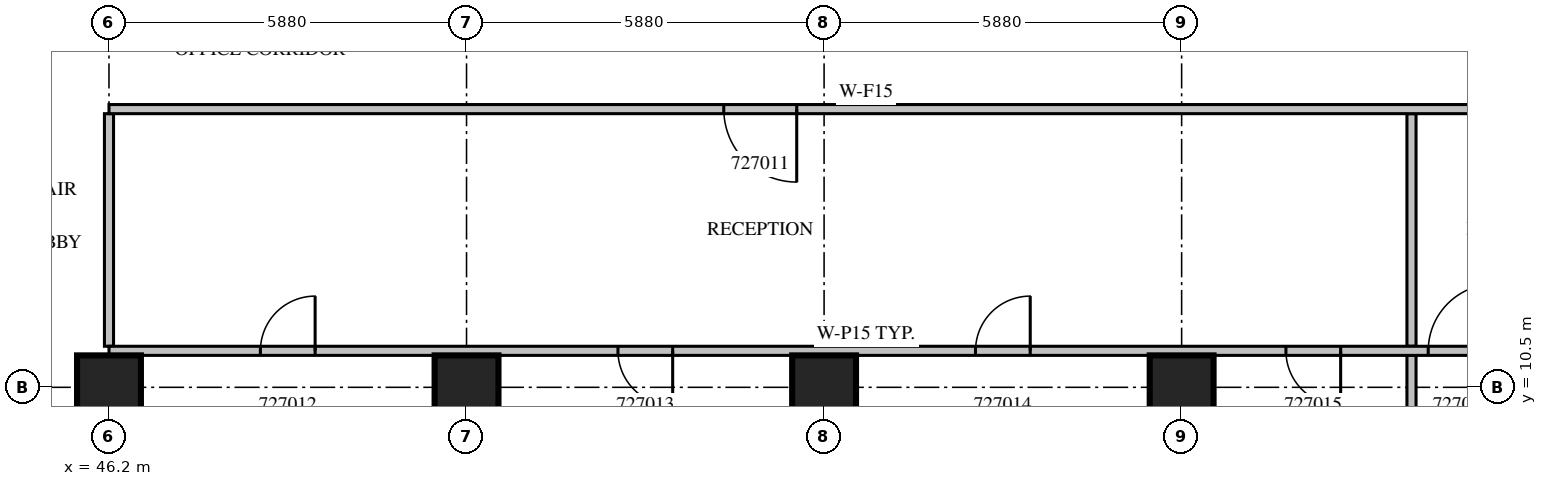
"""IFC4 building model, lengths in metres.
Left out: names, types, materials, properties, quantities, classifications, styles, units other than length and angle.
Written with IfcOpenShell. Run it as: python <this file> out.ifc"""

import sys

from ifc_helpers import new_model, si_unit, direction, frame, frame_2d, origin, origin_2d, place, context, subcontext, project, spatial, rectangle, extrude, source, transform, mapped, element, fill, save


model = new_model("IFC4")
c1 = context("Model", 3, precision=1e-05, world=origin(), true_north=direction((0.0, 1.0)))
c2 = subcontext(c1, "Body", "Model", "MODEL_VIEW")
j1 = project(units=[si_unit("LENGTHUNIT", "METRE"), si_unit("PLANEANGLEUNIT", "RADIAN")], contexts=[c1])
p1 = place(None, origin())
s1 = spatial("IfcSite", under=j1, at=p1, CompositionType="ELEMENT")
p2 = place(p1, origin())
s2 = spatial("IfcBuilding", under=s1, at=p2, CompositionType="ELEMENT")
p3 = place(p2, frame((0.0, 0.0, 124.5)))
s3 = spatial("IfcBuildingStorey", under=s2, at=p3, CompositionType="ELEMENT", Elevation=124.5)
m1 = source(origin(), c2, "Body", "SweptSolid", [
    extrude(rectangle(XDim=1.05, YDim=1.05, at=origin_2d()), origin(), (0.0, 0.0, 1.0), 4.2),
])
for number, where, z_axis, x_axis in (
    (1, (46.2, 10.5, 0.0), (0.0, 0.0, 1.0), (1.0, 0.0, 0.0)),
    (2, (52.08, 10.5, 0.0), (0.0, 0.0, 1.0), (1.0, 0.0, 0.0)),
    (3, (57.96, 10.5, 0.0), (0.0, 0.0, 1.0), (1.0, 0.0, 0.0)),
    (4, (63.84, 10.5, 0.0), (0.0, 0.0, 1.0), (1.0, 0.0, 0.0)),
):
    element("IfcColumn", number, at=place(p3, frame(where, z_axis=z_axis, x_axis=x_axis)), inside=s3, PredefinedType="COLUMN", context=c2, shape_type="MappedRepresentation", body=[
        mapped(m1, transform((0.0, 0.0, 0.0), scale=1.0)),
    ])
m2 = source(origin(), c2, "Body", "SweptSolid", [
    extrude(rectangle(XDim=3.825, YDim=0.15, at=frame_2d((1.913, 0.0))), origin(), (0.0, 0.0, 1.0), 3.8),
])
p4 = place(p3, frame((46.2, 11.175, 0.0), z_axis=(0.0, 0.0, 1.0), x_axis=(0.0, 1.0, 0.0)))
e5 = element("IfcWall", 5, at=p4, inside=s3, PredefinedType="PARTITIONING", context=c2, shape_type="MappedRepresentation", body=[
    mapped(m2, transform((0.0, 0.0, 0.0), scale=1.0)),
])
m3 = source(origin(), c2, "Body", "SweptSolid", [
    extrude(rectangle(XDim=6.62, YDim=0.15, at=frame_2d((3.31, 0.0))), origin(), (0.0, 0.0, 1.0), 3.8),
])
p5 = place(p3, frame((67.62, 4.405, 0.0), z_axis=(0.0, 0.0, 1.0), x_axis=(0.0, 1.0, 0.0)))
e6 = element("IfcWall", 6, at=p5, inside=s3, PredefinedType="PARTITIONING", context=c2, shape_type="MappedRepresentation", body=[
    mapped(m3, transform((0.0, 0.0, 0.0), scale=1.0)),
])
p6 = place(p3, frame((67.62, 11.175, 0.0), z_axis=(0.0, 0.0, 1.0), x_axis=(0.0, 1.0, 0.0)))
e7 = element("IfcWall", 7, at=p6, inside=s3, PredefinedType="PARTITIONING", context=c2, shape_type="MappedRepresentation", body=[
    mapped(m2, transform((0.0, 0.0, 0.0), scale=1.0)),
])
m4 = source(origin(), c2, "Body", "SweptSolid", [
    extrude(rectangle(XDim=24.9, YDim=0.15, at=frame_2d((12.45, 0.0))), origin(), (0.0, 0.0, 1.0), 3.8),
])
p7 = place(p3, frame((71.1, 11.1, 0.0), z_axis=(0.0, 0.0, 1.0), x_axis=(-1.0, 0.0, 0.0)))
e8 = element("IfcWall", 8, at=p7, inside=s3, PredefinedType="PARTITIONING", context=c2, shape_type="MappedRepresentation", body=[
    mapped(m4, transform((0.0, 0.0, 0.0), scale=1.0)),
])
m5 = source(origin(), c2, "Body", "SweptSolid", [
    extrude(rectangle(XDim=0.9, YDim=2.1, at=frame_2d((0.45, 1.05))), frame((0.0, 0.085, 0.0), z_axis=(0.0, -1.0, 0.0), x_axis=(1.0, 0.0, 0.0)), (0.0, 0.0, 1.0), 0.17),
])
p8 = place(p7, frame((21.51, 0.0, 0.0)))
e9 = element("IfcOpeningElement", 9, at=p8, cuts=e8, PredefinedType="OPENING", context=c2, shape_type="MappedRepresentation", body=[
    mapped(m5, transform((0.0, 0.0, 0.0), scale=1.0)),
])
p9 = place(p7, frame((15.63, 0.0, 0.0)))
e10 = element("IfcOpeningElement", 10, at=p9, cuts=e8, PredefinedType="OPENING", context=c2, shape_type="MappedRepresentation", body=[
    mapped(m5, transform((0.0, 0.0, 0.0), scale=1.0)),
])
p10 = place(p7, frame((9.75, 0.0, 0.0)))
e11 = element("IfcOpeningElement", 11, at=p10, cuts=e8, PredefinedType="OPENING", context=c2, shape_type="MappedRepresentation", body=[
    mapped(m5, transform((0.0, 0.0, 0.0), scale=1.0)),
])
p11 = place(p7, frame((4.645, 0.0, 0.0)))
e12 = element("IfcOpeningElement", 12, at=p11, cuts=e8, PredefinedType="OPENING", context=c2, shape_type="MappedRepresentation", body=[
    mapped(m5, transform((0.0, 0.0, 0.0), scale=1.0)),
])
m6 = source(origin(), c2, "Body", "SweptSolid", [
    extrude(rectangle(XDim=1.1, YDim=2.1, at=frame_2d((0.55, 1.05))), frame((0.0, 0.085, 0.0), z_axis=(0.0, -1.0, 0.0), x_axis=(1.0, 0.0, 0.0)), (0.0, 0.0, 1.0), 0.17),
])
p12 = place(p7, frame((2.105, 0.0, 0.0)))
e13 = element("IfcOpeningElement", 13, at=p12, cuts=e8, PredefinedType="OPENING", context=c2, shape_type="MappedRepresentation", body=[
    mapped(m6, transform((0.0, 0.0, 0.0), scale=1.0)),
])
p13 = place(p3, frame((71.1, 15.075, 0.0), z_axis=(0.0, 0.0, 1.0), x_axis=(-1.0, 0.0, 0.0)))
e14 = element("IfcWall", 14, at=p13, inside=s3, PredefinedType="PARTITIONING", context=c2, shape_type="MappedRepresentation", body=[
    mapped(m4, transform((0.0, 0.0, 0.0), scale=1.0)),
])
m7 = source(origin(), c2, "Body", "SweptSolid", [
    extrude(rectangle(XDim=1.2, YDim=2.1, at=frame_2d((0.6, 1.05))), frame((0.0, 0.085, 0.0), z_axis=(0.0, -1.0, 0.0), x_axis=(1.0, 0.0, 0.0)), (0.0, 0.0, 1.0), 0.17),
])
p14 = place(p13, frame((13.59, 0.0, 0.0)))
e15 = element("IfcOpeningElement", 15, at=p14, cuts=e14, PredefinedType="OPENING", context=c2, shape_type="MappedRepresentation", body=[
    mapped(m7, transform((0.0, 0.0, 0.0), scale=1.0)),
])
p15 = place(p13, frame((1.153, 0.0, 0.0)))
e16 = element("IfcOpeningElement", 16, at=p15, cuts=e14, PredefinedType="OPENING", context=c2, shape_type="MappedRepresentation", body=[
    mapped(m6, transform((0.0, 0.0, 0.0), scale=1.0)),
])
m8 = source(origin(), c2, "Body", "SweptSolid", [
    extrude(rectangle(XDim=1.2, YDim=2.1, at=frame_2d((0.6, 1.05))), frame((0.0, 0.025, 0.0), z_axis=(0.0, -1.0, 0.0), x_axis=(1.0, 0.0, 0.0)), (0.0, 0.0, 1.0), 0.05),
])
p16 = place(p14, origin())
e17 = element("IfcDoor", 17, at=p16, inside=s3, OperationType="SINGLE_SWING_LEFT", PredefinedType="DOOR", context=c2, shape_type="MappedRepresentation", body=[
    mapped(m8, transform((0.0, 0.0, 0.0), scale=1.0)),
])
fill(e15, e17)
m9 = source(origin(), c2, "Body", "SweptSolid", [
    extrude(rectangle(XDim=0.9, YDim=2.1, at=frame_2d((0.45, 1.05))), frame((0.0, 0.025, 0.0), z_axis=(0.0, -1.0, 0.0), x_axis=(1.0, 0.0, 0.0)), (0.0, 0.0, 1.0), 0.05),
])
p17 = place(p8, origin())
e18 = element("IfcDoor", 18, at=p17, inside=s3, OperationType="SINGLE_SWING_RIGHT", PredefinedType="DOOR", context=c2, shape_type="MappedRepresentation", body=[
    mapped(m9, transform((0.0, 0.0, 0.0), scale=1.0)),
])
fill(e9, e18)
p18 = place(p9, origin())
e19 = element("IfcDoor", 19, at=p18, inside=s3, OperationType="SINGLE_SWING_LEFT", PredefinedType="DOOR", context=c2, shape_type="MappedRepresentation", body=[
    mapped(m9, transform((0.0, 0.0, 0.0), scale=1.0)),
])
fill(e10, e19)
p19 = place(p10, origin())
e20 = element("IfcDoor", 20, at=p19, inside=s3, OperationType="SINGLE_SWING_RIGHT", PredefinedType="DOOR", context=c2, shape_type="MappedRepresentation", body=[
    mapped(m9, transform((0.0, 0.0, 0.0), scale=1.0)),
])
fill(e11, e20)
p20 = place(p11, origin())
e21 = element("IfcDoor", 21, at=p20, inside=s3, OperationType="SINGLE_SWING_LEFT", PredefinedType="DOOR", context=c2, shape_type="MappedRepresentation", body=[
    mapped(m9, transform((0.0, 0.0, 0.0), scale=1.0)),
])
fill(e12, e21)
m10 = source(origin(), c2, "Body", "SweptSolid", [
    extrude(rectangle(XDim=1.1, YDim=2.1, at=frame_2d((0.55, 1.05))), frame((0.0, 0.025, 0.0), z_axis=(0.0, -1.0, 0.0), x_axis=(1.0, 0.0, 0.0)), (0.0, 0.0, 1.0), 0.05),
])
p21 = place(p12, origin())
e22 = element("IfcDoor", 22, at=p21, inside=s3, OperationType="SINGLE_SWING_RIGHT", PredefinedType="DOOR", context=c2, shape_type="MappedRepresentation", body=[
    mapped(m10, transform((0.0, 0.0, 0.0), scale=1.0)),
])
fill(e13, e22)
save(model, sys.argv[1])
